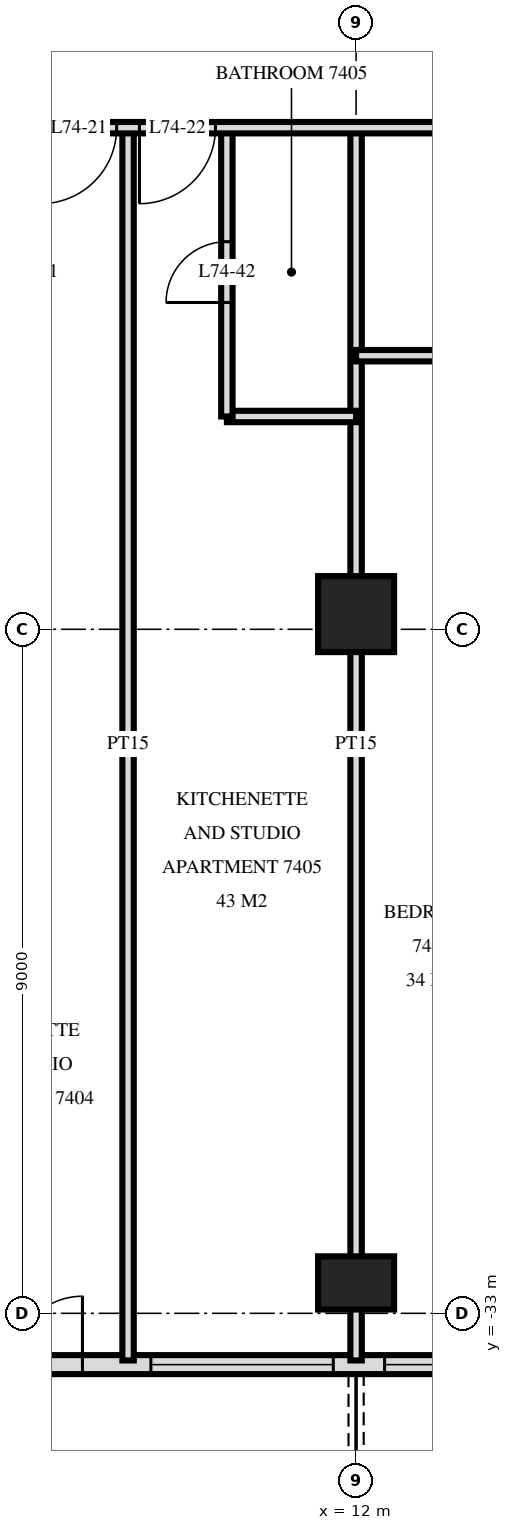
"""IFC4 building model, lengths in metres.
Left out: names, types, materials, properties, quantities, classifications, styles, units other than length and angle.
Written with IfcOpenShell. Run it as: python <this file> out.ifc"""

import sys

from ifc_helpers import new_model, si_unit, direction, frame, frame_2d, origin, origin_2d, place, context, subcontext, project, spatial, rectangle, extrude, element, fill, save


model = new_model("IFC4")
c1 = context("Model", 3, precision=1e-05, world=origin(), true_north=direction((0.0, 1.0)))
c2 = subcontext(c1, "Body", "Model", "MODEL_VIEW")
j1 = project(units=[si_unit("LENGTHUNIT", "METRE"), si_unit("PLANEANGLEUNIT", "RADIAN")], contexts=[c1])
p1 = place(None, origin())
s1 = spatial("IfcSite", under=j1, at=p1, CompositionType="ELEMENT")
p2 = place(p1, origin())
s2 = spatial("IfcBuilding", under=s1, at=p2, CompositionType="ELEMENT")
p3 = place(p2, frame((0.0, 0.0, 280.6)))
s3 = spatial("IfcBuildingStorey", under=s2, at=p3, CompositionType="ELEMENT", Elevation=280.6)
p4 = place(p3, frame((12.0, -32.6, 0.0), z_axis=(0.0, 0.0, 1.0), x_axis=(1.0, 0.0, 0.0)))
e1 = element("IfcColumn", 1, at=p4, inside=s3, PredefinedType="COLUMN", context=c2, shape_type="SweptSolid", body=[
    extrude(rectangle(XDim=1.0, YDim=0.7, at=origin_2d()), origin(), (0.0, 0.0, 1.0), 3.5),
])
p5 = place(p3, frame((12.0, -23.8, 0.0), z_axis=(0.0, 0.0, 1.0), x_axis=(1.0, 0.0, 0.0)))
e2 = element("IfcColumn", 2, at=p5, inside=s3, PredefinedType="COLUMN", context=c2, shape_type="SweptSolid", body=[
    extrude(rectangle(XDim=1.0, YDim=1.0, at=origin_2d()), origin(), (0.0, 0.0, 1.0), 3.5),
])
p6 = place(p3, frame((-18.575, -33.675, 0.0), z_axis=(0.0, 0.0, 1.0), x_axis=(1.0, 0.0, 0.0)))
e3 = element("IfcWall", 3, at=p6, inside=s3, PredefinedType="SOLIDWALL", context=c2, shape_type="SweptSolid", body=[
    extrude(rectangle(XDim=37.151, YDim=0.25, at=frame_2d((18.575, 0.0))), origin(), (0.0, 0.0, 1.0), 3.22),
])
p7 = place(p6, frame((4.175, 0.0, 0.0)))
e4 = element("IfcOpeningElement", 4, at=p7, cuts=e3, PredefinedType="OPENING", context=c2, shape_type="SweptSolid", body=[
    extrude(rectangle(XDim=1.8, YDim=2.4, at=frame_2d((0.9, 1.2))), frame((0.0, 0.135, 0.0), z_axis=(0.0, -1.0, 0.0), x_axis=(1.0, 0.0, 0.0)), (0.0, 0.0, 1.0), 0.27),
])
p8 = place(p6, frame((7.512, 0.0, 0.0)))
e5 = element("IfcOpeningElement", 5, at=p8, cuts=e3, PredefinedType="OPENING", context=c2, shape_type="SweptSolid", body=[
    extrude(rectangle(XDim=1.8, YDim=2.4, at=frame_2d((0.9, 1.2))), frame((0.0, 0.135, 0.0), z_axis=(0.0, -1.0, 0.0), x_axis=(1.0, 0.0, 0.0)), (0.0, 0.0, 1.0), 0.27),
])
p9 = place(p6, frame((10.287, 0.0, 0.9)))
e6 = element("IfcOpeningElement", 6, at=p9, cuts=e3, PredefinedType="OPENING", context=c2, shape_type="SweptSolid", body=[
    extrude(rectangle(XDim=1.8, YDim=1.5, at=frame_2d((0.9, 0.75))), frame((0.0, 0.135, 0.0), z_axis=(0.0, -1.0, 0.0), x_axis=(1.0, 0.0, 0.0)), (0.0, 0.0, 1.0), 0.27),
])
p10 = place(p6, frame((12.875, 0.0, 0.9)))
e7 = element("IfcOpeningElement", 7, at=p10, cuts=e3, PredefinedType="OPENING", context=c2, shape_type="SweptSolid", body=[
    extrude(rectangle(XDim=2.4, YDim=1.5, at=frame_2d((1.2, 0.75))), frame((0.0, 0.135, 0.0), z_axis=(0.0, -1.0, 0.0), x_axis=(1.0, 0.0, 0.0)), (0.0, 0.0, 1.0), 0.27),
])
p11 = place(p6, frame((16.175, 0.0, 0.0)))
e8 = element("IfcOpeningElement", 8, at=p11, cuts=e3, PredefinedType="OPENING", context=c2, shape_type="SweptSolid", body=[
    extrude(rectangle(XDim=1.8, YDim=2.4, at=frame_2d((0.9, 1.2))), frame((0.0, 0.135, 0.0), z_axis=(0.0, -1.0, 0.0), x_axis=(1.0, 0.0, 0.0)), (0.0, 0.0, 1.0), 0.27),
])
p12 = place(p6, frame((19.175, 0.0, 0.0)))
e9 = element("IfcOpeningElement", 9, at=p12, cuts=e3, PredefinedType="OPENING", context=c2, shape_type="SweptSolid", body=[
    extrude(rectangle(XDim=1.8, YDim=2.4, at=frame_2d((0.9, 1.2))), frame((0.0, 0.135, 0.0), z_axis=(0.0, -1.0, 0.0), x_axis=(1.0, 0.0, 0.0)), (0.0, 0.0, 1.0), 0.27),
])
p13 = place(p6, frame((21.875, 0.0, 0.9)))
e10 = element("IfcOpeningElement", 10, at=p13, cuts=e3, PredefinedType="OPENING", context=c2, shape_type="SweptSolid", body=[
    extrude(rectangle(XDim=2.4, YDim=1.5, at=frame_2d((1.2, 0.75))), frame((0.0, 0.135, 0.0), z_axis=(0.0, -1.0, 0.0), x_axis=(1.0, 0.0, 0.0)), (0.0, 0.0, 1.0), 0.27),
])
p14 = place(p6, frame((25.175, 0.0, 0.0)))
e11 = element("IfcOpeningElement", 11, at=p14, cuts=e3, PredefinedType="OPENING", context=c2, shape_type="SweptSolid", body=[
    extrude(rectangle(XDim=1.8, YDim=2.4, at=frame_2d((0.9, 1.2))), frame((0.0, 0.135, 0.0), z_axis=(0.0, -1.0, 0.0), x_axis=(1.0, 0.0, 0.0)), (0.0, 0.0, 1.0), 0.27),
])
p15 = place(p6, frame((27.875, 0.0, 0.9)))
e12 = element("IfcOpeningElement", 12, at=p15, cuts=e3, PredefinedType="OPENING", context=c2, shape_type="SweptSolid", body=[
    extrude(rectangle(XDim=2.4, YDim=1.5, at=frame_2d((1.2, 0.75))), frame((0.0, 0.135, 0.0), z_axis=(0.0, -1.0, 0.0), x_axis=(1.0, 0.0, 0.0)), (0.0, 0.0, 1.0), 0.27),
])
p16 = place(p6, frame((30.95, 0.0, 0.9)))
e13 = element("IfcOpeningElement", 13, at=p16, cuts=e3, PredefinedType="OPENING", context=c2, shape_type="SweptSolid", body=[
    extrude(rectangle(XDim=1.8, YDim=1.5, at=frame_2d((0.9, 0.75))), frame((0.0, 0.135, 0.0), z_axis=(0.0, -1.0, 0.0), x_axis=(1.0, 0.0, 0.0)), (0.0, 0.0, 1.0), 0.27),
])
p17 = place(p6, frame((34.175, 0.0, 0.0)))
e14 = element("IfcOpeningElement", 14, at=p17, cuts=e3, PredefinedType="OPENING", context=c2, shape_type="SweptSolid", body=[
    extrude(rectangle(XDim=1.8, YDim=2.4, at=frame_2d((0.9, 1.2))), frame((0.0, 0.135, 0.0), z_axis=(0.0, -1.0, 0.0), x_axis=(1.0, 0.0, 0.0)), (0.0, 0.0, 1.0), 0.27),
])
p18 = place(p3, frame((12.0, -33.62, 0.0), z_axis=(0.0, 0.0, 1.0), x_axis=(0.0, 1.0, 0.0)))
e15 = element("IfcWall", 15, at=p18, inside=s3, PredefinedType="PARTITIONING", context=c2, shape_type="SweptSolid", body=[
    extrude(rectangle(XDim=16.22, YDim=0.15, at=frame_2d((8.11, 0.0))), origin(), (0.0, 0.0, 1.0), 3.22),
])
p19 = place(p3, frame((10.3, -21.2, 0.0), z_axis=(0.0, 0.0, 1.0), x_axis=(0.0, 1.0, 0.0)))
e16 = element("IfcWall", 16, at=p19, inside=s3, PredefinedType="PARTITIONING", context=c2, shape_type="SweptSolid", body=[
    extrude(rectangle(XDim=3.8, YDim=0.15, at=frame_2d((1.9, 0.0))), origin(), (0.0, 0.0, 1.0), 3.22),
])
p20 = place(p19, frame((1.5, 0.0, 0.0)))
e17 = element("IfcOpeningElement", 17, at=p20, cuts=e16, PredefinedType="OPENING", context=c2, shape_type="SweptSolid", body=[
    extrude(rectangle(XDim=0.8, YDim=2.1, at=frame_2d((0.4, 1.05))), frame((0.0, 0.085, 0.0), z_axis=(0.0, -1.0, 0.0), x_axis=(1.0, 0.0, 0.0)), (0.0, 0.0, 1.0), 0.17),
])
p21 = place(p3, frame((9.0, -33.62, 0.0), z_axis=(0.0, 0.0, 1.0), x_axis=(0.0, 1.0, 0.0)))
e18 = element("IfcWall", 18, at=p21, inside=s3, PredefinedType="PARTITIONING", context=c2, shape_type="SweptSolid", body=[
    extrude(rectangle(XDim=16.22, YDim=0.15, at=frame_2d((8.11, 0.0))), origin(), (0.0, 0.0, 1.0), 3.22),
])
p22 = place(p3, frame((10.3, -21.2, 0.0), z_axis=(0.0, 0.0, 1.0), x_axis=(1.0, 0.0, 0.0)))
e19 = element("IfcWall", 19, at=p22, inside=s3, PredefinedType="PARTITIONING", context=c2, shape_type="SweptSolid", body=[
    extrude(rectangle(XDim=1.7, YDim=0.15, at=frame_2d((0.85, 0.0))), origin(), (0.0, 0.0, 1.0), 3.22),
])
p23 = place(p3, frame((12.0, -20.4, 0.0), z_axis=(0.0, 0.0, 1.0), x_axis=(1.0, 0.0, 0.0)))
e20 = element("IfcWall", 20, at=p23, inside=s3, PredefinedType="PARTITIONING", context=c2, shape_type="SweptSolid", body=[
    extrude(rectangle(XDim=2.4, YDim=0.15, at=frame_2d((1.2, 0.0))), origin(), (0.0, 0.0, 1.0), 3.22),
])
p24 = place(p3, frame((-22.92, -17.4, 0.0), z_axis=(0.0, 0.0, 1.0), x_axis=(1.0, 0.0, 0.0)))
e21 = element("IfcWall", 21, at=p24, inside=s3, PredefinedType="PARTITIONING", context=c2, shape_type="SweptSolid", body=[
    extrude(rectangle(XDim=45.84, YDim=0.15, at=frame_2d((22.92, 0.0))), origin(), (0.0, 0.0, 1.0), 3.22),
])
p25 = place(p24, frame((21.67, 0.0, 0.0)))
e22 = element("IfcOpeningElement", 22, at=p25, cuts=e21, PredefinedType="OPENING", context=c2, shape_type="SweptSolid", body=[
    extrude(rectangle(XDim=1.0, YDim=2.1, at=frame_2d((0.5, 1.05))), frame((0.0, 0.085, 0.0), z_axis=(0.0, -1.0, 0.0), x_axis=(1.0, 0.0, 0.0)), (0.0, 0.0, 1.0), 0.17),
])
p26 = place(p24, frame((24.77, 0.0, 0.0)))
e23 = element("IfcOpeningElement", 23, at=p26, cuts=e21, PredefinedType="OPENING", context=c2, shape_type="SweptSolid", body=[
    extrude(rectangle(XDim=1.0, YDim=2.1, at=frame_2d((0.5, 1.05))), frame((0.0, 0.085, 0.0), z_axis=(0.0, -1.0, 0.0), x_axis=(1.0, 0.0, 0.0)), (0.0, 0.0, 1.0), 0.17),
])
p27 = place(p24, frame((26.07, 0.0, 0.0)))
e24 = element("IfcOpeningElement", 24, at=p27, cuts=e21, PredefinedType="OPENING", context=c2, shape_type="SweptSolid", body=[
    extrude(rectangle(XDim=1.0, YDim=2.1, at=frame_2d((0.5, 1.05))), frame((0.0, 0.085, 0.0), z_axis=(0.0, -1.0, 0.0), x_axis=(1.0, 0.0, 0.0)), (0.0, 0.0, 1.0), 0.17),
])
p28 = place(p24, frame((30.77, 0.0, 0.0)))
e25 = element("IfcOpeningElement", 25, at=p28, cuts=e21, PredefinedType="OPENING", context=c2, shape_type="SweptSolid", body=[
    extrude(rectangle(XDim=1.0, YDim=2.1, at=frame_2d((0.5, 1.05))), frame((0.0, 0.085, 0.0), z_axis=(0.0, -1.0, 0.0), x_axis=(1.0, 0.0, 0.0)), (0.0, 0.0, 1.0), 0.17),
])
p29 = place(p24, frame((32.07, 0.0, 0.0)))
e26 = element("IfcOpeningElement", 26, at=p29, cuts=e21, PredefinedType="OPENING", context=c2, shape_type="SweptSolid", body=[
    extrude(rectangle(XDim=1.0, YDim=2.1, at=frame_2d((0.5, 1.05))), frame((0.0, 0.085, 0.0), z_axis=(0.0, -1.0, 0.0), x_axis=(1.0, 0.0, 0.0)), (0.0, 0.0, 1.0), 0.17),
])
p30 = place(p24, frame((9.42, 0.0, 0.0)))
e27 = element("IfcOpeningElement", 27, at=p30, cuts=e21, PredefinedType="OPENING", context=c2, shape_type="SweptSolid", body=[
    extrude(rectangle(XDim=1.0, YDim=2.1, at=frame_2d((0.5, 1.05))), frame((0.0, 0.085, 0.0), z_axis=(0.0, -1.0, 0.0), x_axis=(1.0, 0.0, 0.0)), (0.0, 0.0, 1.0), 0.17),
])
p31 = place(p24, frame((2.67, 0.0, 0.0)))
e28 = element("IfcOpeningElement", 28, at=p31, cuts=e21, PredefinedType="OPENING", context=c2, shape_type="SweptSolid", body=[
    extrude(rectangle(XDim=1.0, YDim=2.1, at=frame_2d((0.5, 1.05))), frame((0.0, 0.085, 0.0), z_axis=(0.0, -1.0, 0.0), x_axis=(1.0, 0.0, 0.0)), (0.0, 0.0, 1.0), 0.17),
])
p32 = place(p24, frame((37.82, 0.0, 0.0)))
e29 = element("IfcOpeningElement", 29, at=p32, cuts=e21, PredefinedType="OPENING", context=c2, shape_type="SweptSolid", body=[
    extrude(rectangle(XDim=1.0, YDim=2.1, at=frame_2d((0.5, 1.05))), frame((0.0, 0.085, 0.0), z_axis=(0.0, -1.0, 0.0), x_axis=(1.0, 0.0, 0.0)), (0.0, 0.0, 1.0), 0.17),
])
p33 = place(p14, origin())
e30 = element("IfcDoor", 30, at=p33, inside=s3, OperationType="DOUBLE_DOOR_SINGLE_SWING", PredefinedType="DOOR", context=c2, shape_type="SweptSolid", body=[
    extrude(rectangle(XDim=1.8, YDim=2.4, at=frame_2d((0.9, 1.2))), frame((0.0, 0.025, 0.0), z_axis=(0.0, -1.0, 0.0), x_axis=(1.0, 0.0, 0.0)), (0.0, 0.0, 1.0), 0.05),
])
fill(e11, e30)
p34 = place(p15, origin())
e31 = element("IfcWindow", 31, at=p34, inside=s3, PartitioningType="SINGLE_PANEL", PredefinedType="WINDOW", context=c2, shape_type="SweptSolid", body=[
    extrude(rectangle(XDim=2.4, YDim=1.5, at=frame_2d((1.2, 0.75))), frame((0.0, 0.03, 0.0), z_axis=(0.0, -1.0, 0.0), x_axis=(1.0, 0.0, 0.0)), (0.0, 0.0, 1.0), 0.06),
])
fill(e12, e31)
p35 = place(p16, origin())
e32 = element("IfcWindow", 32, at=p35, inside=s3, PartitioningType="SINGLE_PANEL", PredefinedType="WINDOW", context=c2, shape_type="SweptSolid", body=[
    extrude(rectangle(XDim=1.8, YDim=1.5, at=frame_2d((0.9, 0.75))), frame((0.0, 0.03, 0.0), z_axis=(0.0, -1.0, 0.0), x_axis=(1.0, 0.0, 0.0)), (0.0, 0.0, 1.0), 0.06),
])
fill(e13, e32)
p36 = place(p28, frame((0.5, 0.0, 0.0), z_axis=(0.0, 0.0, 1.0), x_axis=(-1.0, 0.0, 0.0)))
e33 = element("IfcDoor", 33, at=p36, inside=s3, OperationType="SINGLE_SWING_LEFT", PredefinedType="DOOR", context=c2, shape_type="SweptSolid", body=[
    extrude(rectangle(XDim=1.0, YDim=2.1, at=frame_2d((0.0, 1.05))), frame((0.0, -0.025, 0.0), z_axis=(0.0, 1.0, 0.0), x_axis=(-1.0, 0.0, 0.0)), (0.0, 0.0, 1.0), 0.05),
])
fill(e25, e33)
p37 = place(p29, frame((0.5, 0.0, 0.0), z_axis=(0.0, 0.0, 1.0), x_axis=(-1.0, 0.0, 0.0)))
e34 = element("IfcDoor", 34, at=p37, inside=s3, OperationType="SINGLE_SWING_LEFT", PredefinedType="DOOR", context=c2, shape_type="SweptSolid", body=[
    extrude(rectangle(XDim=1.0, YDim=2.1, at=frame_2d((0.0, 1.05))), frame((0.0, -0.025, 0.0), z_axis=(0.0, 1.0, 0.0), x_axis=(-1.0, 0.0, 0.0)), (0.0, 0.0, 1.0), 0.05),
])
fill(e26, e34)
p38 = place(p20, origin())
e35 = element("IfcDoor", 35, at=p38, inside=s3, OperationType="SINGLE_SWING_RIGHT", PredefinedType="DOOR", context=c2, shape_type="SweptSolid", body=[
    extrude(rectangle(XDim=0.8, YDim=2.1, at=frame_2d((0.4, 1.05))), frame((0.0, 0.025, 0.0), z_axis=(0.0, -1.0, 0.0), x_axis=(1.0, 0.0, 0.0)), (0.0, 0.0, 1.0), 0.05),
])
fill(e17, e35)
save(model, sys.argv[1])
